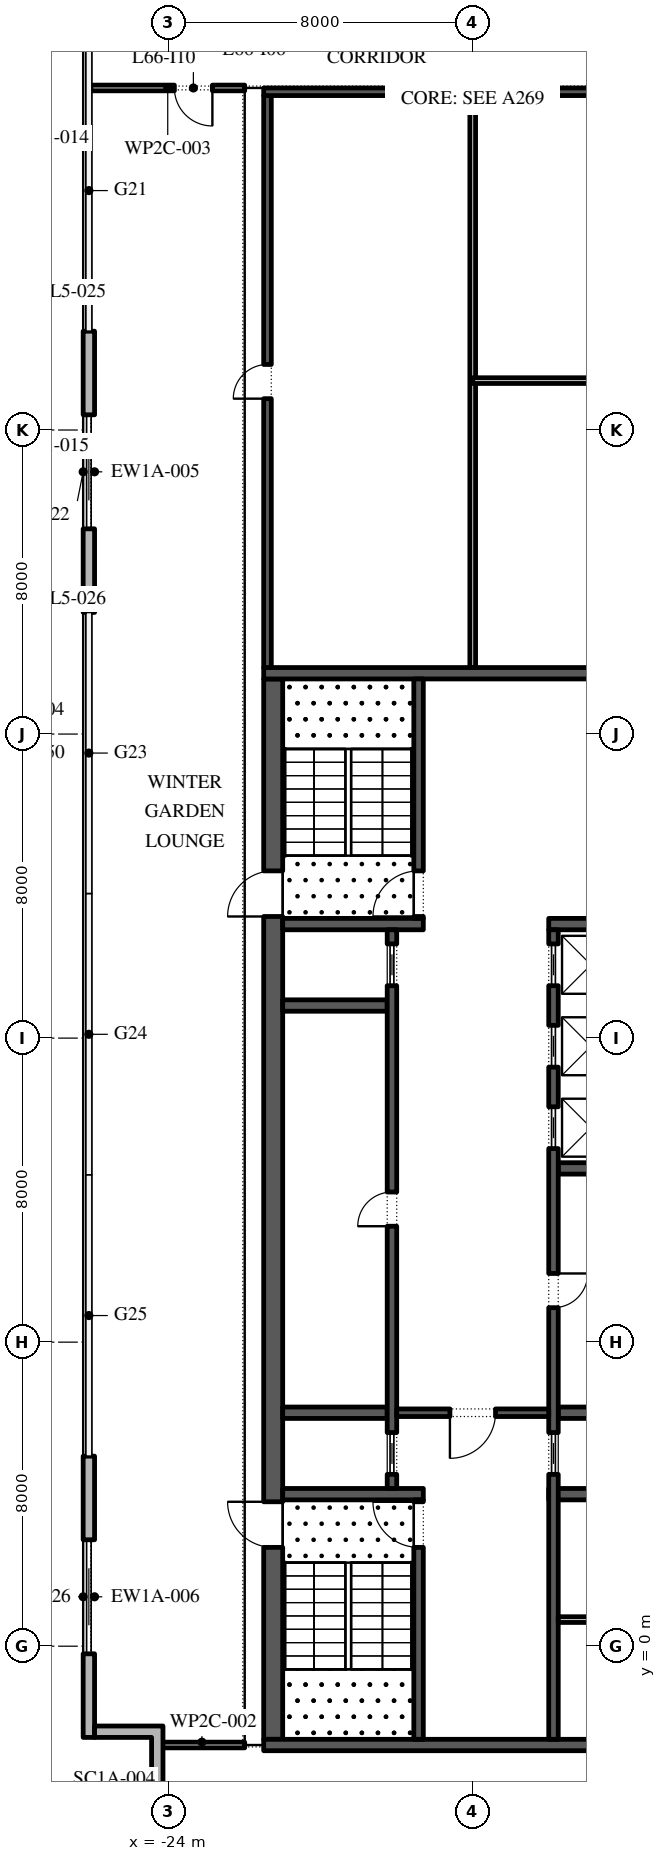
"""IFC4 building model, lengths in metres.
Left out: names, types, materials, properties, quantities, classifications, styles, units other than length and angle.
Written with IfcOpenShell. Run it as: python <this file> out.ifc"""

import sys

from ifc_helpers import new_model, si_unit, direction, frame, frame_2d, origin, place, context, subcontext, project, spatial, polyline, rectangle, outline, extrude, element, fill, save


model = new_model("IFC4")
c1 = context("Model", 3, precision=1e-05, world=origin(), true_north=direction((0.0, 1.0)))
c2 = subcontext(c1, "Body", "Model", "MODEL_VIEW")
j1 = project(units=[si_unit("LENGTHUNIT", "METRE"), si_unit("PLANEANGLEUNIT", "RADIAN")], contexts=[c1])
p1 = place(None, origin())
s1 = spatial("IfcSite", under=j1, at=p1, CompositionType="ELEMENT")
p2 = place(p1, origin())
s2 = spatial("IfcBuilding", under=s1, at=p2, CompositionType="ELEMENT")
p3 = place(p2, frame((0.0, 0.0, 303.0)))
s3 = spatial("IfcBuildingStorey", under=s2, at=p3, CompositionType="ELEMENT", Elevation=303.0)
p4 = place(p3, frame((-26.1, 34.6, 0.0), z_axis=(0.0, 0.0, 1.0), x_axis=(0.0, -1.0, 0.0)))
e1 = element("IfcWall", 1, at=p4, inside=s3, PredefinedType="STANDARD", context=c2, shape_type="SweptSolid", body=[
    extrude(rectangle(XDim=7.4, YDim=0.3, at=frame_2d((3.7, 0.0))), origin(), (0.0, 0.0, 1.0), 5.8),
])
p5 = place(p4, frame((2.2, 0.0, 0.0)))
e2 = element("IfcOpeningElement", 2, at=p5, cuts=e1, PredefinedType="OPENING", context=c2, shape_type="SweptSolid", body=[
    extrude(rectangle(XDim=3.0, YDim=3.5, at=frame_2d((1.5, 1.75))), frame((0.0, 0.16, 0.0), z_axis=(0.0, -1.0, 0.0), x_axis=(1.0, 0.0, 0.0)), (0.0, 0.0, 1.0), 0.32),
])
p6 = place(p3, frame((-26.1, 5.0, 0.0), z_axis=(0.0, 0.0, 1.0), x_axis=(0.0, -1.0, 0.0)))
e3 = element("IfcWall", 3, at=p6, inside=s3, PredefinedType="STANDARD", context=c2, shape_type="SweptSolid", body=[
    extrude(rectangle(XDim=7.4, YDim=0.3, at=frame_2d((3.7, 0.0))), origin(), (0.0, 0.0, 1.0), 5.8),
])
p7 = place(p6, frame((2.2, 0.0, 0.0)))
e4 = element("IfcOpeningElement", 4, at=p7, cuts=e3, PredefinedType="OPENING", context=c2, shape_type="SweptSolid", body=[
    extrude(rectangle(XDim=3.0, YDim=3.5, at=frame_2d((1.5, 1.75))), frame((0.0, 0.16, 0.0), z_axis=(0.0, -1.0, 0.0), x_axis=(1.0, 0.0, 0.0)), (0.0, 0.0, 1.0), 0.32),
])
p8 = place(p3, origin())
e5 = element("IfcWall", 5, at=p8, inside=s3, PredefinedType="STANDARD", context=c2, shape_type="SweptSolid", body=[
    extrude(outline(polyline([(-22.65, -4.2), (-24.45, -4.2), (-24.45, -2.4), (-25.95, -2.4), (-25.95, -2.1), (-24.15, -2.1), (-24.15, -3.9), (-22.35, -3.9), (-22.35, -6.0), (-22.65, -6.0), (-22.65, -4.2)])), origin(), (0.0, 0.0, 1.0), 5.8),
])
p9 = place(p3, frame((-21.25, -2.45, 0.0), z_axis=(0.0, 0.0, 1.0), x_axis=(0.0, 1.0, 0.0)))
e6 = element("IfcWall", 6, at=p9, inside=s3, PredefinedType="SHEAR", context=c2, shape_type="SweptSolid", body=[
    extrude(rectangle(XDim=27.9, YDim=0.5, at=frame_2d((13.95, 0.0))), origin(), (0.0, 0.0, 1.0), 5.8),
])
p10 = place(p9, frame((5.05, 0.0, 0.0)))
e7 = element("IfcOpeningElement", 7, at=p10, cuts=e6, PredefinedType="OPENING", context=c2, shape_type="SweptSolid", body=[
    extrude(rectangle(XDim=1.2, YDim=2.1, at=frame_2d((0.6, 1.05))), frame((0.0, 0.26, 0.0), z_axis=(0.0, -1.0, 0.0), x_axis=(1.0, 0.0, 0.0)), (0.0, 0.0, 1.0), 0.52),
])
p11 = place(p9, frame((21.65, 0.0, 0.0)))
e8 = element("IfcOpeningElement", 8, at=p11, cuts=e6, PredefinedType="OPENING", context=c2, shape_type="SweptSolid", body=[
    extrude(rectangle(XDim=1.2, YDim=2.1, at=frame_2d((0.6, 1.05))), frame((0.0, 0.26, 0.0), z_axis=(0.0, -1.0, 0.0), x_axis=(1.0, 0.0, 0.0)), (0.0, 0.0, 1.0), 0.52),
])
for number, where, z_axis, x_axis in (
    (9, (-21.5, -2.6, 0.0), (0.0, 0.0, 1.0), (1.0, 0.0, 0.0)),
    (10, (-21.5, 25.6, 0.0), (0.0, 0.0, 1.0), (1.0, 0.0, 0.0)),
):
    element("IfcWall", number, at=place(p3, frame(where, z_axis=z_axis, x_axis=x_axis)), inside=s3, PredefinedType="SHEAR", context=c2, shape_type="SweptSolid", body=[
        extrude(rectangle(XDim=11.0, YDim=0.3, at=frame_2d((5.5, 0.0))), origin(), (0.0, 0.0, 1.0), 5.8),
    ])
p12 = place(p3, frame((-21.0, 4.0, 0.0), z_axis=(0.0, 0.0, 1.0), x_axis=(1.0, 0.0, 0.0)))
e11 = element("IfcWall", 11, at=p12, inside=s3, PredefinedType="SHEAR", context=c2, shape_type="SweptSolid", body=[
    extrude(rectangle(XDim=3.7, YDim=0.3, at=frame_2d((1.85, 0.0))), origin(), (0.0, 0.0, 1.0), 5.8),
])
p13 = place(p3, frame((-17.425, -2.45, 0.0), z_axis=(0.0, 0.0, 1.0), x_axis=(0.0, 1.0, 0.0)))
e12 = element("IfcWall", 12, at=p13, inside=s3, PredefinedType="SHEAR", context=c2, shape_type="SweptSolid", body=[
    extrude(rectangle(XDim=6.3, YDim=0.25, at=frame_2d((3.15, 0.0))), origin(), (0.0, 0.0, 1.0), 5.8),
])
p14 = place(p13, frame((5.05, 0.0, 0.0)))
e13 = element("IfcOpeningElement", 13, at=p14, cuts=e12, PredefinedType="OPENING", context=c2, shape_type="SweptSolid", body=[
    extrude(rectangle(XDim=1.2, YDim=2.1, at=frame_2d((0.6, 1.05))), frame((0.0, 0.135, 0.0), z_axis=(0.0, -1.0, 0.0), x_axis=(1.0, 0.0, 0.0)), (0.0, 0.0, 1.0), 0.27),
])
p15 = place(p3, frame((-21.0, 19.0, 0.0), z_axis=(0.0, 0.0, 1.0), x_axis=(1.0, 0.0, 0.0)))
e14 = element("IfcWall", 14, at=p15, inside=s3, PredefinedType="SHEAR", context=c2, shape_type="SweptSolid", body=[
    extrude(rectangle(XDim=3.7, YDim=0.3, at=frame_2d((1.85, 0.0))), origin(), (0.0, 0.0, 1.0), 5.8),
])
p16 = place(p3, frame((-17.425, 19.15, 0.0), z_axis=(0.0, 0.0, 1.0), x_axis=(0.0, 1.0, 0.0)))
e15 = element("IfcWall", 15, at=p16, inside=s3, PredefinedType="SHEAR", context=c2, shape_type="SweptSolid", body=[
    extrude(rectangle(XDim=6.3, YDim=0.25, at=frame_2d((3.15, 0.0))), origin(), (0.0, 0.0, 1.0), 5.8),
])
p17 = place(p16, frame((0.05, 0.0, 0.0)))
e16 = element("IfcOpeningElement", 16, at=p17, cuts=e15, PredefinedType="OPENING", context=c2, shape_type="SweptSolid", body=[
    extrude(rectangle(XDim=1.2, YDim=2.1, at=frame_2d((0.6, 1.05))), frame((0.0, 0.135, 0.0), z_axis=(0.0, -1.0, 0.0), x_axis=(1.0, 0.0, 0.0)), (0.0, 0.0, 1.0), 0.27),
])
for number, where, z_axis, x_axis in (
    (17, (-21.0, 6.143, 0.0), (0.0, 0.0, 1.0), (1.0, 0.0, 0.0)),
    (18, (-21.0, 16.857, 0.0), (0.0, 0.0, 1.0), (1.0, 0.0, 0.0)),
):
    element("IfcWall", number, at=place(p3, frame(where, z_axis=z_axis, x_axis=x_axis)), inside=s3, PredefinedType="SHEAR", context=c2, shape_type="SweptSolid", body=[
        extrude(rectangle(XDim=2.75, YDim=0.3, at=frame_2d((1.375, 0.0))), origin(), (0.0, 0.0, 1.0), 5.8),
    ])
p18 = place(p3, frame((-18.125, 4.15, 0.0), z_axis=(0.0, 0.0, 1.0), x_axis=(0.0, 1.0, 0.0)))
e19 = element("IfcWall", 19, at=p18, inside=s3, PredefinedType="SHEAR", context=c2, shape_type="SweptSolid", body=[
    extrude(rectangle(XDim=14.7, YDim=0.25, at=frame_2d((7.35, 0.0))), origin(), (0.0, 0.0, 1.0), 5.8),
])
p19 = place(p18, frame((6.9, 0.0, 0.0)))
e20 = element("IfcOpeningElement", 20, at=p19, cuts=e19, PredefinedType="OPENING", context=c2, shape_type="SweptSolid", body=[
    extrude(rectangle(XDim=0.9, YDim=2.1, at=frame_2d((0.45, 1.05))), frame((0.0, 0.135, 0.0), z_axis=(0.0, -1.0, 0.0), x_axis=(1.0, 0.0, 0.0)), (0.0, 0.0, 1.0), 0.27),
])
p20 = place(p18, frame((0.371, 0.0, 0.0)))
e21 = element("IfcOpeningElement", 21, at=p20, cuts=e19, PredefinedType="OPENING", context=c2, shape_type="SweptSolid", body=[
    extrude(rectangle(XDim=1.1, YDim=2.1, at=frame_2d((0.55, 1.05))), frame((0.0, 0.135, 0.0), z_axis=(0.0, -1.0, 0.0), x_axis=(1.0, 0.0, 0.0)), (0.0, 0.0, 1.0), 0.27),
])
p21 = place(p18, frame((13.229, 0.0, 0.0)))
e22 = element("IfcOpeningElement", 22, at=p21, cuts=e19, PredefinedType="OPENING", context=c2, shape_type="SweptSolid", body=[
    extrude(rectangle(XDim=1.1, YDim=2.1, at=frame_2d((0.55, 1.05))), frame((0.0, 0.135, 0.0), z_axis=(0.0, -1.0, 0.0), x_axis=(1.0, 0.0, 0.0)), (0.0, 0.0, 1.0), 0.27),
])
p22 = place(p3, frame((-14.0, 4.0, 0.0), z_axis=(0.0, 0.0, 1.0), x_axis=(1.0, 0.0, 0.0)))
e23 = element("IfcWall", 23, at=p22, inside=s3, PredefinedType="SHEAR", context=c2, shape_type="SweptSolid", body=[
    extrude(rectangle(XDim=3.0, YDim=0.3, at=frame_2d((1.5, 0.0))), origin(), (0.0, 0.0, 1.0), 5.8),
])
for number, where, z_axis, x_axis in (
    (24, (-13.75, 6.143, 0.0), (0.0, 0.0, 1.0), (1.0, 0.0, 0.0)),
    (25, (-13.75, 12.571, 0.0), (0.0, 0.0, 1.0), (1.0, 0.0, 0.0)),
):
    element("IfcWall", number, at=place(p3, frame(where, z_axis=z_axis, x_axis=x_axis)), inside=s3, PredefinedType="SHEAR", context=c2, shape_type="SweptSolid", body=[
        extrude(rectangle(XDim=2.75, YDim=0.3, at=frame_2d((1.375, 0.0))), origin(), (0.0, 0.0, 1.0), 5.8),
    ])
p23 = place(p3, frame((-14.0, 19.0, 0.0), z_axis=(0.0, 0.0, 1.0), x_axis=(1.0, 0.0, 0.0)))
e26 = element("IfcWall", 26, at=p23, inside=s3, PredefinedType="SHEAR", context=c2, shape_type="SweptSolid", body=[
    extrude(rectangle(XDim=3.0, YDim=0.3, at=frame_2d((1.5, 0.0))), origin(), (0.0, 0.0, 1.0), 5.8),
])
p24 = place(p3, frame((-13.875, -2.45, 0.0), z_axis=(0.0, 0.0, 1.0), x_axis=(0.0, 1.0, 0.0)))
e27 = element("IfcWall", 27, at=p24, inside=s3, PredefinedType="SHEAR", context=c2, shape_type="SweptSolid", body=[
    extrude(rectangle(XDim=21.3, YDim=0.25, at=frame_2d((10.65, 0.0))), origin(), (0.0, 0.0, 1.0), 5.8),
])
p25 = place(p24, frame((11.357, 0.0, 0.0)))
e28 = element("IfcOpeningElement", 28, at=p25, cuts=e27, PredefinedType="OPENING", context=c2, shape_type="SweptSolid", body=[
    extrude(rectangle(XDim=0.9, YDim=2.1, at=frame_2d((0.45, 1.05))), frame((0.0, 0.135, 0.0), z_axis=(0.0, -1.0, 0.0), x_axis=(1.0, 0.0, 0.0)), (0.0, 0.0, 1.0), 0.27),
])
p26 = place(p24, frame((6.971, 0.0, 0.0)))
e29 = element("IfcOpeningElement", 29, at=p26, cuts=e27, PredefinedType="OPENING", context=c2, shape_type="SweptSolid", body=[
    extrude(rectangle(XDim=1.1, YDim=2.1, at=frame_2d((0.55, 1.05))), frame((0.0, 0.135, 0.0), z_axis=(0.0, -1.0, 0.0), x_axis=(1.0, 0.0, 0.0)), (0.0, 0.0, 1.0), 0.27),
])
p27 = place(p24, frame((15.543, 0.0, 0.0)))
e30 = element("IfcOpeningElement", 30, at=p27, cuts=e27, PredefinedType="OPENING", context=c2, shape_type="SweptSolid", body=[
    extrude(rectangle(XDim=1.1, YDim=2.1, at=frame_2d((0.55, 1.05))), frame((0.0, 0.135, 0.0), z_axis=(0.0, -1.0, 0.0), x_axis=(1.0, 0.0, 0.0)), (0.0, 0.0, 1.0), 0.27),
])
p28 = place(p24, frame((17.686, 0.0, 0.0)))
e31 = element("IfcOpeningElement", 31, at=p28, cuts=e27, PredefinedType="OPENING", context=c2, shape_type="SweptSolid", body=[
    extrude(rectangle(XDim=1.1, YDim=2.1, at=frame_2d((0.55, 1.05))), frame((0.0, 0.135, 0.0), z_axis=(0.0, -1.0, 0.0), x_axis=(1.0, 0.0, 0.0)), (0.0, 0.0, 1.0), 0.27),
])
p29 = place(p24, frame((19.829, 0.0, 0.0)))
e32 = element("IfcOpeningElement", 32, at=p29, cuts=e27, PredefinedType="OPENING", context=c2, shape_type="SweptSolid", body=[
    extrude(rectangle(XDim=1.1, YDim=2.1, at=frame_2d((0.55, 1.05))), frame((0.0, 0.135, 0.0), z_axis=(0.0, -1.0, 0.0), x_axis=(1.0, 0.0, 0.0)), (0.0, 0.0, 1.0), 0.27),
])
p30 = place(p3, frame((-18.0, 6.143, 0.0), z_axis=(0.0, 0.0, 1.0), x_axis=(1.0, 0.0, 0.0)))
e33 = element("IfcWall", 33, at=p30, inside=s3, PredefinedType="SHEAR", context=c2, shape_type="SweptSolid", body=[
    extrude(rectangle(XDim=4.0, YDim=0.2, at=frame_2d((2.0, 0.0))), origin(), (0.0, 0.0, 1.0), 5.8),
])
p31 = place(p30, frame((1.4, 0.0, 0.0)))
e34 = element("IfcOpeningElement", 34, at=p31, cuts=e33, PredefinedType="OPENING", context=c2, shape_type="SweptSolid", body=[
    extrude(rectangle(XDim=1.2, YDim=2.1, at=frame_2d((0.6, 1.05))), frame((0.0, 0.11, 0.0), z_axis=(0.0, -1.0, 0.0), x_axis=(1.0, 0.0, 0.0)), (0.0, 0.0, 1.0), 0.22),
])
p32 = place(p3, frame((-13.75, 0.7, 0.0), z_axis=(0.0, 0.0, 1.0), x_axis=(1.0, 0.0, 0.0)))
e35 = element("IfcWall", 35, at=p32, inside=s3, PredefinedType="PARTITIONING", context=c2, shape_type="SweptSolid", body=[
    extrude(rectangle(XDim=2.75, YDim=0.15, at=frame_2d((1.375, 0.0))), origin(), (0.0, 0.0, 1.0), 5.8),
])
p33 = place(p3, frame((-21.4, 25.75, 0.0), z_axis=(0.0, 0.0, 1.0), x_axis=(0.0, 1.0, 0.0)))
e36 = element("IfcWall", 36, at=p33, inside=s3, PredefinedType="SHEAR", context=c2, shape_type="SweptSolid", body=[
    extrude(rectangle(XDim=15.05, YDim=0.2, at=frame_2d((7.525, 0.0))), origin(), (0.0, 0.0, 1.0), 5.8),
])
p34 = place(p33, frame((7.075, 0.0, 0.0)))
e37 = element("IfcOpeningElement", 37, at=p34, cuts=e36, PredefinedType="OPENING", context=c2, shape_type="SweptSolid", body=[
    extrude(rectangle(XDim=0.9, YDim=2.1, at=frame_2d((0.45, 1.05))), frame((0.0, 0.11, 0.0), z_axis=(0.0, -1.0, 0.0), x_axis=(1.0, 0.0, 0.0)), (0.0, 0.0, 1.0), 0.22),
])
p35 = place(p3, frame((-21.5, 40.9, 0.0), z_axis=(0.0, 0.0, 1.0), x_axis=(1.0, 0.0, 0.0)))
e38 = element("IfcWall", 38, at=p35, inside=s3, PredefinedType="SHEAR", context=c2, shape_type="SweptSolid", body=[
    extrude(rectangle(XDim=11.0, YDim=0.2, at=frame_2d((5.5, 0.0))), origin(), (0.0, 0.0, 1.0), 5.8),
])
p36 = place(p3, frame((-16.0, 25.75, 0.0), z_axis=(0.0, 0.0, 1.0), x_axis=(0.0, 1.0, 0.0)))
e39 = element("IfcWall", 39, at=p36, inside=s3, PredefinedType="PARTITIONING", context=c2, shape_type="SweptSolid", body=[
    extrude(rectangle(XDim=15.05, YDim=0.15, at=frame_2d((7.525, 0.0))), origin(), (0.0, 0.0, 1.0), 5.8),
])
p37 = place(p3, frame((-16.0, 33.3, 0.0), z_axis=(0.0, 0.0, 1.0), x_axis=(1.0, 0.0, 0.0)))
e40 = element("IfcWall", 40, at=p37, inside=s3, PredefinedType="PARTITIONING", context=c2, shape_type="SweptSolid", body=[
    extrude(rectangle(XDim=5.3, YDim=0.15, at=frame_2d((2.65, 0.0))), origin(), (0.0, 0.0, 1.0), 5.8),
])
p38 = place(p3, frame((-24.25, -2.6, 0.0), z_axis=(0.0, 0.0, 1.0), x_axis=(1.0, 0.0, 0.0)))
e41 = element("IfcWall", 41, at=p38, inside=s3, PredefinedType="PARTITIONING", context=c2, shape_type="SweptSolid", body=[
    extrude(rectangle(XDim=2.25, YDim=0.15, at=frame_2d((1.125, 0.0))), origin(), (0.0, 0.0, 1.0), 5.8),
])
p39 = place(p3, frame((-22.0, 41.0, 0.0), z_axis=(0.0, 0.0, 1.0), x_axis=(-1.0, 0.0, 0.0)))
e42 = element("IfcWall", 42, at=p39, inside=s3, PredefinedType="PARTITIONING", context=c2, shape_type="SweptSolid", body=[
    extrude(rectangle(XDim=4.05, YDim=0.15, at=frame_2d((2.025, 0.0))), origin(), (0.0, 0.0, 1.0), 5.8),
])
p40 = place(p39, frame((0.85, 0.0, 0.0)))
e43 = element("IfcOpeningElement", 43, at=p40, cuts=e42, PredefinedType="OPENING", context=c2, shape_type="SweptSolid", body=[
    extrude(rectangle(XDim=1.0, YDim=2.1, at=frame_2d((0.5, 1.05))), frame((0.0, 0.085, 0.0), z_axis=(0.0, -1.0, 0.0), x_axis=(1.0, 0.0, 0.0)), (0.0, 0.0, 1.0), 0.17),
])
p41 = place(p5, origin())
e44 = element("IfcDoor", 44, at=p41, inside=s3, OperationType="DOUBLE_DOOR_SLIDING", PredefinedType="DOOR", context=c2, shape_type="SweptSolid", body=[
    extrude(rectangle(XDim=3.0, YDim=3.5, at=frame_2d((1.5, 1.75))), frame((0.0, 0.025, 0.0), z_axis=(0.0, -1.0, 0.0), x_axis=(1.0, 0.0, 0.0)), (0.0, 0.0, 1.0), 0.05),
])
fill(e2, e44)
p42 = place(p7, origin())
e45 = element("IfcDoor", 45, at=p42, inside=s3, OperationType="DOUBLE_DOOR_SLIDING", PredefinedType="DOOR", context=c2, shape_type="SweptSolid", body=[
    extrude(rectangle(XDim=3.0, YDim=3.5, at=frame_2d((1.5, 1.75))), frame((0.0, 0.025, 0.0), z_axis=(0.0, -1.0, 0.0), x_axis=(1.0, 0.0, 0.0)), (0.0, 0.0, 1.0), 0.05),
])
fill(e4, e45)
p43 = place(p19, origin())
e46 = element("IfcDoor", 46, at=p43, inside=s3, OperationType="SINGLE_SWING_RIGHT", PredefinedType="DOOR", context=c2, shape_type="SweptSolid", body=[
    extrude(rectangle(XDim=0.9, YDim=2.1, at=frame_2d((0.45, 1.05))), frame((0.0, 0.125, 0.0), z_axis=(0.0, -1.0, 0.0), x_axis=(1.0, 0.0, 0.0)), (0.0, 0.0, 1.0), 0.05),
])
fill(e20, e46)
p44 = place(p20, origin())
e47 = element("IfcDoor", 47, at=p44, inside=s3, OperationType="SLIDING_TO_LEFT", PredefinedType="DOOR", context=c2, shape_type="SweptSolid", body=[
    extrude(rectangle(XDim=1.1, YDim=2.1, at=frame_2d((0.55, 1.05))), frame((0.0, 0.025, 0.0), z_axis=(0.0, -1.0, 0.0), x_axis=(1.0, 0.0, 0.0)), (0.0, 0.0, 1.0), 0.05),
])
fill(e21, e47)
p45 = place(p21, origin())
e48 = element("IfcDoor", 48, at=p45, inside=s3, OperationType="SLIDING_TO_LEFT", PredefinedType="DOOR", context=c2, shape_type="SweptSolid", body=[
    extrude(rectangle(XDim=1.1, YDim=2.1, at=frame_2d((0.55, 1.05))), frame((0.0, 0.025, 0.0), z_axis=(0.0, -1.0, 0.0), x_axis=(1.0, 0.0, 0.0)), (0.0, 0.0, 1.0), 0.05),
])
fill(e22, e48)
p46 = place(p25, frame((0.9, -0.2, 0.0), z_axis=(0.0, 0.0, 1.0), x_axis=(-1.0, 0.0, 0.0)))
e49 = element("IfcDoor", 49, at=p46, inside=s3, OperationType="SINGLE_SWING_RIGHT", PredefinedType="DOOR", context=c2, shape_type="SweptSolid", body=[
    extrude(rectangle(XDim=0.9, YDim=2.1, at=frame_2d((0.45, 1.05))), frame((0.0, -0.075, 0.0), z_axis=(0.0, -1.0, 0.0), x_axis=(1.0, 0.0, 0.0)), (0.0, 0.0, 1.0), 0.05),
])
fill(e28, e49)
p47 = place(p26, origin())
e50 = element("IfcDoor", 50, at=p47, inside=s3, OperationType="SLIDING_TO_LEFT", PredefinedType="DOOR", context=c2, shape_type="SweptSolid", body=[
    extrude(rectangle(XDim=1.1, YDim=2.1, at=frame_2d((0.55, 1.05))), frame((0.0, 0.025, 0.0), z_axis=(0.0, -1.0, 0.0), x_axis=(1.0, 0.0, 0.0)), (0.0, 0.0, 1.0), 0.05),
])
fill(e29, e50)
p48 = place(p27, origin())
e51 = element("IfcDoor", 51, at=p48, inside=s3, OperationType="SLIDING_TO_LEFT", PredefinedType="DOOR", context=c2, shape_type="SweptSolid", body=[
    extrude(rectangle(XDim=1.1, YDim=2.1, at=frame_2d((0.55, 1.05))), frame((0.0, 0.025, 0.0), z_axis=(0.0, -1.0, 0.0), x_axis=(1.0, 0.0, 0.0)), (0.0, 0.0, 1.0), 0.05),
])
fill(e30, e51)
p49 = place(p28, origin())
e52 = element("IfcDoor", 52, at=p49, inside=s3, OperationType="SLIDING_TO_LEFT", PredefinedType="DOOR", context=c2, shape_type="SweptSolid", body=[
    extrude(rectangle(XDim=1.1, YDim=2.1, at=frame_2d((0.55, 1.05))), frame((0.0, 0.025, 0.0), z_axis=(0.0, -1.0, 0.0), x_axis=(1.0, 0.0, 0.0)), (0.0, 0.0, 1.0), 0.05),
])
fill(e31, e52)
p50 = place(p29, origin())
e53 = element("IfcDoor", 53, at=p50, inside=s3, OperationType="SLIDING_TO_LEFT", PredefinedType="DOOR", context=c2, shape_type="SweptSolid", body=[
    extrude(rectangle(XDim=1.1, YDim=2.1, at=frame_2d((0.55, 1.05))), frame((0.0, 0.025, 0.0), z_axis=(0.0, -1.0, 0.0), x_axis=(1.0, 0.0, 0.0)), (0.0, 0.0, 1.0), 0.05),
])
fill(e32, e53)
p51 = place(p31, frame((1.2, 0.0, 0.0), z_axis=(0.0, 0.0, 1.0), x_axis=(-1.0, 0.0, 0.0)))
e54 = element("IfcDoor", 54, at=p51, inside=s3, OperationType="SINGLE_SWING_LEFT", PredefinedType="DOOR", context=c2, shape_type="SweptSolid", body=[
    extrude(rectangle(XDim=1.2, YDim=2.1, at=frame_2d((0.6, 1.05))), frame((0.0, 0.025, 0.0), z_axis=(0.0, -1.0, 0.0), x_axis=(1.0, 0.0, 0.0)), (0.0, 0.0, 1.0), 0.05),
])
fill(e34, e54)
p52 = place(p14, origin())
e55 = element("IfcDoor", 55, at=p52, inside=s3, OperationType="SINGLE_SWING_LEFT", PredefinedType="DOOR", context=c2, shape_type="SweptSolid", body=[
    extrude(rectangle(XDim=1.2, YDim=2.1, at=frame_2d((0.6, 1.05))), frame((0.0, 0.025, 0.0), z_axis=(0.0, -1.0, 0.0), x_axis=(1.0, 0.0, 0.0)), (0.0, 0.0, 1.0), 0.05),
])
fill(e13, e55)
p53 = place(p10, origin())
e56 = element("IfcDoor", 56, at=p53, inside=s3, OperationType="SINGLE_SWING_LEFT", PredefinedType="DOOR", context=c2, shape_type="SweptSolid", body=[
    extrude(rectangle(XDim=1.2, YDim=2.1, at=frame_2d((0.6, 1.05))), frame((0.0, 0.025, 0.0), z_axis=(0.0, -1.0, 0.0), x_axis=(1.0, 0.0, 0.0)), (0.0, 0.0, 1.0), 0.05),
])
fill(e7, e56)
p54 = place(p17, origin())
e57 = element("IfcDoor", 57, at=p54, inside=s3, OperationType="SINGLE_SWING_RIGHT", PredefinedType="DOOR", context=c2, shape_type="SweptSolid", body=[
    extrude(rectangle(XDim=1.2, YDim=2.1, at=frame_2d((0.6, 1.05))), frame((0.0, 0.025, 0.0), z_axis=(0.0, -1.0, 0.0), x_axis=(1.0, 0.0, 0.0)), (0.0, 0.0, 1.0), 0.05),
])
fill(e16, e57)
p55 = place(p11, origin())
e58 = element("IfcDoor", 58, at=p55, inside=s3, OperationType="SINGLE_SWING_RIGHT", PredefinedType="DOOR", context=c2, shape_type="SweptSolid", body=[
    extrude(rectangle(XDim=1.2, YDim=2.1, at=frame_2d((0.6, 1.05))), frame((0.0, 0.025, 0.0), z_axis=(0.0, -1.0, 0.0), x_axis=(1.0, 0.0, 0.0)), (0.0, 0.0, 1.0), 0.05),
])
fill(e8, e58)
p56 = place(p34, origin())
e59 = element("IfcDoor", 59, at=p56, inside=s3, OperationType="SINGLE_SWING_RIGHT", PredefinedType="DOOR", context=c2, shape_type="SweptSolid", body=[
    extrude(rectangle(XDim=0.9, YDim=2.1, at=frame_2d((0.45, 1.05))), frame((0.0, -0.05, 0.0), z_axis=(0.0, -1.0, 0.0), x_axis=(1.0, 0.0, 0.0)), (0.0, 0.0, 1.0), 0.05),
])
fill(e37, e59)
p57 = place(p40, origin())
e60 = element("IfcDoor", 60, at=p57, inside=s3, OperationType="SINGLE_SWING_RIGHT", PredefinedType="DOOR", context=c2, shape_type="SweptSolid", body=[
    extrude(rectangle(XDim=1.0, YDim=2.1, at=frame_2d((0.5, 1.05))), frame((0.0, 0.025, 0.0), z_axis=(0.0, -1.0, 0.0), x_axis=(1.0, 0.0, 0.0)), (0.0, 0.0, 1.0), 0.05),
])
fill(e43, e60)
save(model, sys.argv[1])
